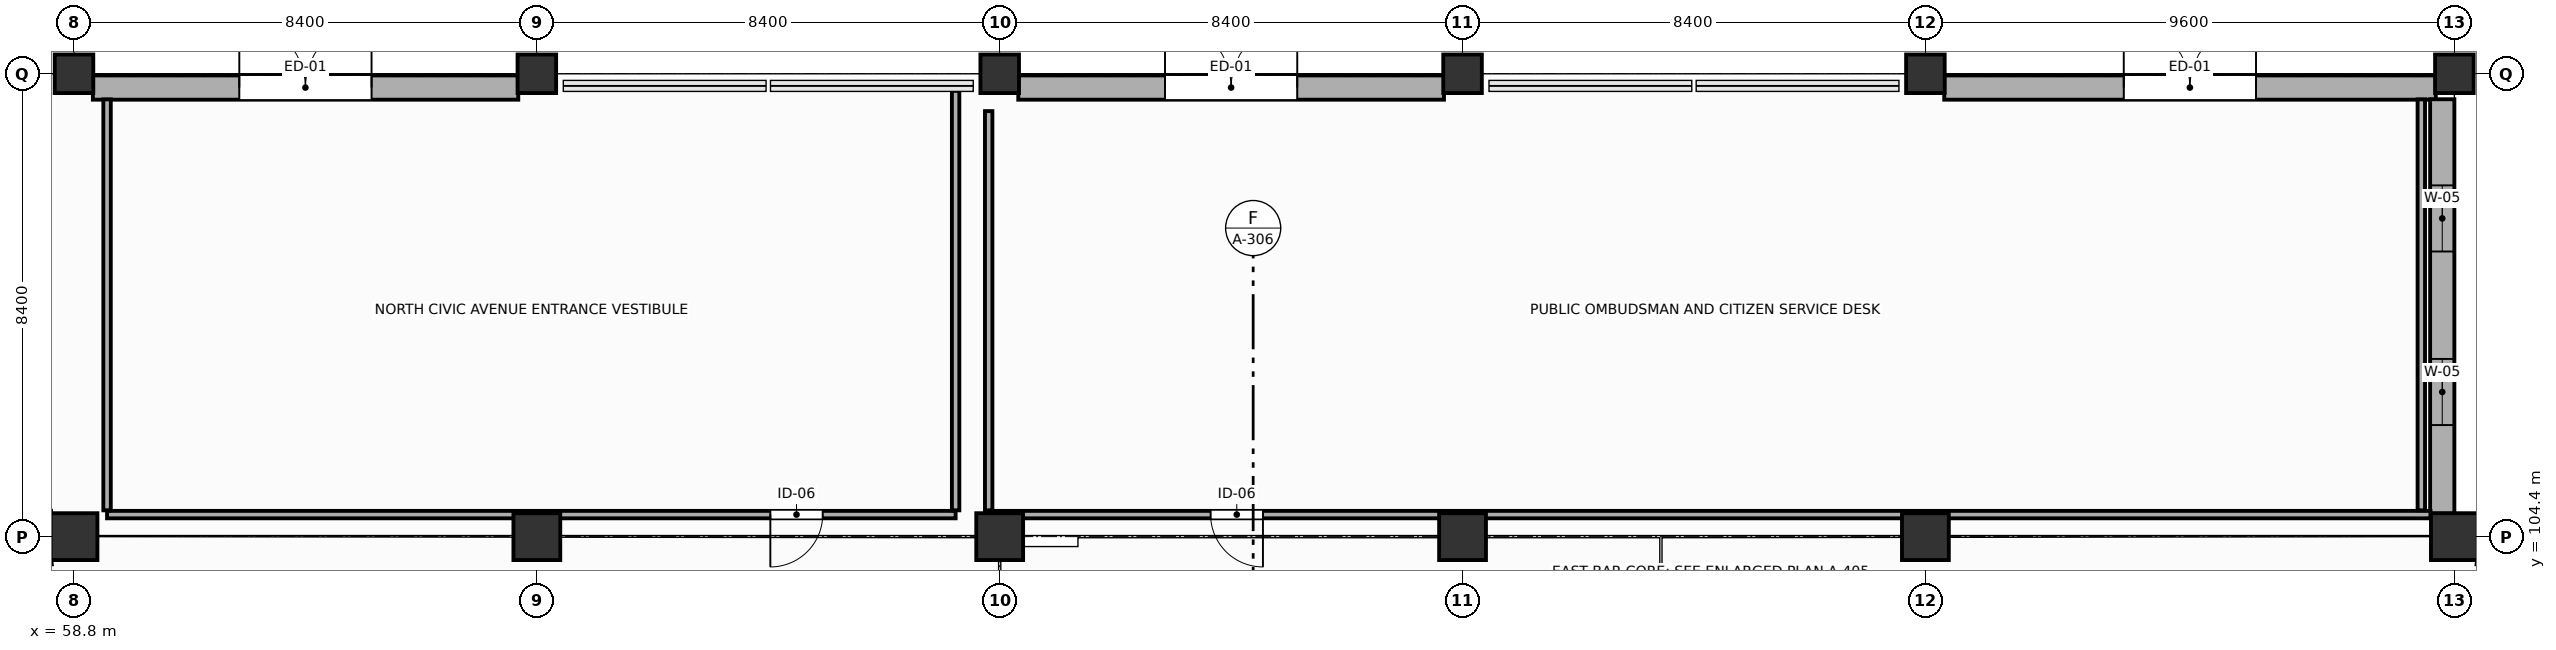
"""IFC4 building model, lengths in metres.
Left out: names, types, materials, properties, quantities, classifications, styles, units other than length and angle.
Written with IfcOpenShell. Run it as: python <this file> out.ifc"""

import sys

from ifc_helpers import new_model, si_unit, direction, frame, frame_2d, origin, origin_2d, place, context, subcontext, project, spatial, rectangle, extrude, element, fill, save


model = new_model("IFC4")
c1 = context("Model", 3, precision=1e-05, world=origin(), true_north=direction((0.0, 1.0)))
c2 = subcontext(c1, "Body", "Model", "MODEL_VIEW")
j1 = project(units=[si_unit("LENGTHUNIT", "METRE"), si_unit("PLANEANGLEUNIT", "RADIAN")], contexts=[c1])
p1 = place(None, origin())
s1 = spatial("IfcSite", under=j1, at=p1, CompositionType="ELEMENT")
p2 = place(p1, origin())
s2 = spatial("IfcBuilding", under=s1, at=p2, CompositionType="ELEMENT")
p3 = place(p2, origin())
s3 = spatial("IfcBuildingStorey", under=s2, at=p3, CompositionType="ELEMENT", Elevation=0.0)
p4 = place(p3, frame((58.8, 104.4, 0.0), z_axis=(0.0, 0.0, 1.0), x_axis=(1.0, 0.0, 0.0)))
e1 = element("IfcColumn", 1, at=p4, inside=s3, PredefinedType="COLUMN", context=c2, shape_type="SweptSolid", body=[
    extrude(rectangle(XDim=0.85, YDim=0.85, at=origin_2d()), origin(), (0.0, 0.0, 1.0), 5.4),
])
p5 = place(p3, frame((58.8, 112.8, 0.0), z_axis=(0.0, 0.0, 1.0), x_axis=(1.0, 0.0, 0.0)))
e2 = element("IfcColumn", 2, at=p5, inside=s3, PredefinedType="COLUMN", context=c2, shape_type="SweptSolid", body=[
    extrude(rectangle(XDim=0.7, YDim=0.7, at=origin_2d()), origin(), (0.0, 0.0, 1.0), 5.4),
])
p6 = place(p3, frame((67.2, 104.4, 0.0), z_axis=(0.0, 0.0, 1.0), x_axis=(1.0, 0.0, 0.0)))
e3 = element("IfcColumn", 3, at=p6, inside=s3, PredefinedType="COLUMN", context=c2, shape_type="SweptSolid", body=[
    extrude(rectangle(XDim=0.85, YDim=0.85, at=origin_2d()), origin(), (0.0, 0.0, 1.0), 5.4),
])
p7 = place(p3, frame((67.2, 112.8, 0.0), z_axis=(0.0, 0.0, 1.0), x_axis=(1.0, 0.0, 0.0)))
e4 = element("IfcColumn", 4, at=p7, inside=s3, PredefinedType="COLUMN", context=c2, shape_type="SweptSolid", body=[
    extrude(rectangle(XDim=0.7, YDim=0.7, at=origin_2d()), origin(), (0.0, 0.0, 1.0), 5.4),
])
p8 = place(p3, frame((75.6, 104.4, 0.0), z_axis=(0.0, 0.0, 1.0), x_axis=(1.0, 0.0, 0.0)))
e5 = element("IfcColumn", 5, at=p8, inside=s3, PredefinedType="COLUMN", context=c2, shape_type="SweptSolid", body=[
    extrude(rectangle(XDim=0.85, YDim=0.85, at=origin_2d()), origin(), (0.0, 0.0, 1.0), 5.4),
])
p9 = place(p3, frame((75.6, 112.8, 0.0), z_axis=(0.0, 0.0, 1.0), x_axis=(1.0, 0.0, 0.0)))
e6 = element("IfcColumn", 6, at=p9, inside=s3, PredefinedType="COLUMN", context=c2, shape_type="SweptSolid", body=[
    extrude(rectangle(XDim=0.7, YDim=0.7, at=origin_2d()), origin(), (0.0, 0.0, 1.0), 5.4),
])
p10 = place(p3, frame((84.0, 104.4, 0.0), z_axis=(0.0, 0.0, 1.0), x_axis=(1.0, 0.0, 0.0)))
e7 = element("IfcColumn", 7, at=p10, inside=s3, PredefinedType="COLUMN", context=c2, shape_type="SweptSolid", body=[
    extrude(rectangle(XDim=0.85, YDim=0.85, at=origin_2d()), origin(), (0.0, 0.0, 1.0), 5.4),
])
p11 = place(p3, frame((84.0, 112.8, 0.0), z_axis=(0.0, 0.0, 1.0), x_axis=(1.0, 0.0, 0.0)))
e8 = element("IfcColumn", 8, at=p11, inside=s3, PredefinedType="COLUMN", context=c2, shape_type="SweptSolid", body=[
    extrude(rectangle(XDim=0.7, YDim=0.7, at=origin_2d()), origin(), (0.0, 0.0, 1.0), 5.4),
])
p12 = place(p3, frame((92.4, 104.4, 0.0), z_axis=(0.0, 0.0, 1.0), x_axis=(1.0, 0.0, 0.0)))
e9 = element("IfcColumn", 9, at=p12, inside=s3, PredefinedType="COLUMN", context=c2, shape_type="SweptSolid", body=[
    extrude(rectangle(XDim=0.85, YDim=0.85, at=origin_2d()), origin(), (0.0, 0.0, 1.0), 5.4),
])
p13 = place(p3, frame((92.4, 112.8, 0.0), z_axis=(0.0, 0.0, 1.0), x_axis=(1.0, 0.0, 0.0)))
e10 = element("IfcColumn", 10, at=p13, inside=s3, PredefinedType="COLUMN", context=c2, shape_type="SweptSolid", body=[
    extrude(rectangle(XDim=0.7, YDim=0.7, at=origin_2d()), origin(), (0.0, 0.0, 1.0), 5.4),
])
p14 = place(p3, frame((102.0, 104.4, 0.0), z_axis=(0.0, 0.0, 1.0), x_axis=(1.0, 0.0, 0.0)))
e11 = element("IfcColumn", 11, at=p14, inside=s3, PredefinedType="COLUMN", context=c2, shape_type="SweptSolid", body=[
    extrude(rectangle(XDim=0.85, YDim=0.85, at=origin_2d()), origin(), (0.0, 0.0, 1.0), 5.4),
])
p15 = place(p3, frame((102.0, 112.8, 0.0), z_axis=(0.0, 0.0, 1.0), x_axis=(1.0, 0.0, 0.0)))
e12 = element("IfcColumn", 12, at=p15, inside=s3, PredefinedType="COLUMN", context=c2, shape_type="SweptSolid", body=[
    extrude(rectangle(XDim=0.7, YDim=0.7, at=origin_2d()), origin(), (0.0, 0.0, 1.0), 5.4),
])
p16 = place(p3, frame((59.142, 112.55, 0.0), z_axis=(0.0, 0.0, 1.0), x_axis=(1.0, 0.0, 0.0)))
e13 = element("IfcWall", 13, at=p16, inside=s3, PredefinedType="STANDARD", context=c2, shape_type="SweptSolid", body=[
    extrude(rectangle(XDim=7.721, YDim=0.44, at=frame_2d((3.86, 0.0))), origin(), (0.0, 0.0, 1.0), 4.67),
])
p17 = place(p16, frame((2.658, 0.0, 0.0)))
e14 = element("IfcOpeningElement", 14, at=p17, cuts=e13, PredefinedType="OPENING", context=c2, shape_type="SweptSolid", body=[
    extrude(rectangle(XDim=2.4, YDim=2.8, at=frame_2d((1.2, 1.4))), frame((0.0, 0.23, 0.0), z_axis=(0.0, -1.0, 0.0), x_axis=(1.0, 0.0, 0.0)), (0.0, 0.0, 1.0), 0.46),
])
p18 = place(p3, frame((75.937, 112.55, 0.0), z_axis=(0.0, 0.0, 1.0), x_axis=(1.0, 0.0, 0.0)))
e15 = element("IfcWall", 15, at=p18, inside=s3, PredefinedType="STANDARD", context=c2, shape_type="SweptSolid", body=[
    extrude(rectangle(XDim=7.726, YDim=0.44, at=frame_2d((3.863, 0.0))), origin(), (0.0, 0.0, 1.0), 4.67),
])
p19 = place(p18, frame((2.663, 0.0, 0.0)))
e16 = element("IfcOpeningElement", 16, at=p19, cuts=e15, PredefinedType="OPENING", context=c2, shape_type="SweptSolid", body=[
    extrude(rectangle(XDim=2.4, YDim=2.8, at=frame_2d((1.2, 1.4))), frame((0.0, 0.23, 0.0), z_axis=(0.0, -1.0, 0.0), x_axis=(1.0, 0.0, 0.0)), (0.0, 0.0, 1.0), 0.46),
])
p20 = place(p3, frame((92.742, 112.55, 0.0), z_axis=(0.0, 0.0, 1.0), x_axis=(1.0, 0.0, 0.0)))
e17 = element("IfcWall", 17, at=p20, inside=s3, PredefinedType="STANDARD", context=c2, shape_type="SweptSolid", body=[
    extrude(rectangle(XDim=8.921, YDim=0.44, at=frame_2d((4.46, 0.0))), origin(), (0.0, 0.0, 1.0), 4.62),
])
p21 = place(p20, frame((3.258, 0.0, 0.0)))
e18 = element("IfcOpeningElement", 18, at=p21, cuts=e17, PredefinedType="OPENING", context=c2, shape_type="SweptSolid", body=[
    extrude(rectangle(XDim=2.4, YDim=2.8, at=frame_2d((1.2, 1.4))), frame((0.0, 0.23, 0.0), z_axis=(0.0, -1.0, 0.0), x_axis=(1.0, 0.0, 0.0)), (0.0, 0.0, 1.0), 0.46),
])
p22 = place(p3, frame((101.78, 112.338, 0.0), z_axis=(0.0, 0.0, 1.0), x_axis=(0.0, -1.0, 0.0)))
e19 = element("IfcWall", 19, at=p22, inside=s3, PredefinedType="STANDARD", context=c2, shape_type="SweptSolid", body=[
    extrude(rectangle(XDim=7.521, YDim=0.44, at=frame_2d((3.76, 0.0))), origin(), (0.0, 0.0, 1.0), 4.27),
])
p23 = place(p22, frame((1.563, 0.0, 0.9)))
e20 = element("IfcOpeningElement", 20, at=p23, cuts=e19, PredefinedType="OPENING", context=c2, shape_type="SweptSolid", body=[
    extrude(rectangle(XDim=1.2, YDim=1.85, at=frame_2d((0.6, 0.925))), frame((0.0, 0.23, 0.0), z_axis=(0.0, -1.0, 0.0), x_axis=(1.0, 0.0, 0.0)), (0.0, 0.0, 1.0), 0.46),
])
p24 = place(p22, frame((4.713, 0.0, 0.9)))
e21 = element("IfcOpeningElement", 21, at=p24, cuts=e19, PredefinedType="OPENING", context=c2, shape_type="SweptSolid", body=[
    extrude(rectangle(XDim=1.2, YDim=1.85, at=frame_2d((0.6, 0.925))), frame((0.0, 0.23, 0.0), z_axis=(0.0, -1.0, 0.0), x_axis=(1.0, 0.0, 0.0)), (0.0, 0.0, 1.0), 0.46),
])
p25 = place(p3, frame((74.8, 104.8, 0.0), z_axis=(0.0, 0.0, 1.0), x_axis=(-1.0, 0.0, 0.0)))
e22 = element("IfcWall", 22, at=p25, inside=s3, PredefinedType="PARTITIONING", context=c2, shape_type="SweptSolid", body=[
    extrude(rectangle(XDim=15.4, YDim=0.135, at=frame_2d((7.7, 0.0))), origin(), (0.0, 0.0, 1.0), 4.27),
])
p26 = place(p25, frame((2.413, 0.0, 0.0)))
e23 = element("IfcOpeningElement", 23, at=p26, cuts=e22, PredefinedType="OPENING", context=c2, shape_type="SweptSolid", body=[
    extrude(rectangle(XDim=0.95, YDim=2.15, at=frame_2d((0.475, 1.075))), frame((0.0, 0.077, 0.0), z_axis=(0.0, -1.0, 0.0), x_axis=(1.0, 0.0, 0.0)), (0.0, 0.0, 1.0), 0.155),
])
p27 = place(p3, frame((59.4, 104.877, 0.0), z_axis=(0.0, 0.0, 1.0), x_axis=(0.0, 1.0, 0.0)))
e24 = element("IfcWall", 24, at=p27, inside=s3, PredefinedType="PARTITIONING", context=c2, shape_type="SweptSolid", body=[
    extrude(rectangle(XDim=7.458, YDim=0.135, at=frame_2d((3.729, 0.0))), origin(), (0.0, 0.0, 1.0), 4.79),
])
p28 = place(p3, frame((74.8, 112.49, 0.0), z_axis=(0.0, 0.0, 1.0), x_axis=(0.0, -1.0, 0.0)))
e25 = element("IfcWall", 25, at=p28, inside=s3, PredefinedType="PARTITIONING", context=c2, shape_type="SweptSolid", body=[
    extrude(rectangle(XDim=7.613, YDim=0.135, at=frame_2d((3.806, 0.0))), origin(), (0.0, 0.0, 1.0), 4.67),
])
p29 = place(p3, frame((101.566, 104.8, 0.0), z_axis=(0.0, 0.0, 1.0), x_axis=(-1.0, 0.0, 0.0)))
e26 = element("IfcWall", 26, at=p29, inside=s3, PredefinedType="PARTITIONING", context=c2, shape_type="SweptSolid", body=[
    extrude(rectangle(XDim=26.166, YDim=0.135, at=frame_2d((13.083, 0.0))), origin(), (0.0, 0.0, 1.0), 4.27),
])
p30 = place(p29, frame((21.189, 0.0, 0.0)))
e27 = element("IfcOpeningElement", 27, at=p30, cuts=e26, PredefinedType="OPENING", context=c2, shape_type="SweptSolid", body=[
    extrude(rectangle(XDim=0.95, YDim=2.15, at=frame_2d((0.475, 1.075))), frame((0.0, 0.077, 0.0), z_axis=(0.0, -1.0, 0.0), x_axis=(1.0, 0.0, 0.0)), (0.0, 0.0, 1.0), 0.155),
])
p31 = place(p3, frame((75.4, 104.877, 0.0), z_axis=(0.0, 0.0, 1.0), x_axis=(0.0, 1.0, 0.0)))
e28 = element("IfcWall", 28, at=p31, inside=s3, PredefinedType="PARTITIONING", context=c2, shape_type="SweptSolid", body=[
    extrude(rectangle(XDim=7.245, YDim=0.135, at=frame_2d((3.623, 0.0))), origin(), (0.0, 0.0, 1.0), 4.27),
])
p32 = place(p3, frame((101.4, 112.336, 0.0), z_axis=(0.0, 0.0, 1.0), x_axis=(0.0, -1.0, 0.0)))
e29 = element("IfcWall", 29, at=p32, inside=s3, PredefinedType="PARTITIONING", context=c2, shape_type="SweptSolid", body=[
    extrude(rectangle(XDim=7.458, YDim=0.135, at=frame_2d((3.729, 0.0))), origin(), (0.0, 0.0, 1.0), 4.57),
])
p33 = place(p17, origin())
e30 = element("IfcDoor", 30, at=p33, inside=s3, OperationType="DOUBLE_DOOR_SINGLE_SWING", PredefinedType="DOOR", context=c2, shape_type="SweptSolid", body=[
    extrude(rectangle(XDim=2.4, YDim=2.8, at=frame_2d((1.2, 1.4))), frame((0.0, 0.025, 0.0), z_axis=(0.0, -1.0, 0.0), x_axis=(1.0, 0.0, 0.0)), (0.0, 0.0, 1.0), 0.05),
])
fill(e14, e30)
p34 = place(p19, origin())
e31 = element("IfcDoor", 31, at=p34, inside=s3, OperationType="DOUBLE_DOOR_SINGLE_SWING", PredefinedType="DOOR", context=c2, shape_type="SweptSolid", body=[
    extrude(rectangle(XDim=2.4, YDim=2.8, at=frame_2d((1.2, 1.4))), frame((0.0, 0.025, 0.0), z_axis=(0.0, -1.0, 0.0), x_axis=(1.0, 0.0, 0.0)), (0.0, 0.0, 1.0), 0.05),
])
fill(e16, e31)
p35 = place(p21, origin())
e32 = element("IfcDoor", 32, at=p35, inside=s3, OperationType="DOUBLE_DOOR_SINGLE_SWING", PredefinedType="DOOR", context=c2, shape_type="SweptSolid", body=[
    extrude(rectangle(XDim=2.4, YDim=2.8, at=frame_2d((1.2, 1.4))), frame((0.0, 0.025, 0.0), z_axis=(0.0, -1.0, 0.0), x_axis=(1.0, 0.0, 0.0)), (0.0, 0.0, 1.0), 0.05),
])
fill(e18, e32)
p36 = place(p23, origin())
e33 = element("IfcWindow", 33, at=p36, inside=s3, PartitioningType="SINGLE_PANEL", PredefinedType="WINDOW", context=c2, shape_type="SweptSolid", body=[
    extrude(rectangle(XDim=1.2, YDim=1.85, at=frame_2d((0.6, 0.925))), frame((0.0, 0.03, 0.0), z_axis=(0.0, -1.0, 0.0), x_axis=(1.0, 0.0, 0.0)), (0.0, 0.0, 1.0), 0.06),
])
fill(e20, e33)
p37 = place(p24, origin())
e34 = element("IfcWindow", 34, at=p37, inside=s3, PartitioningType="SINGLE_PANEL", PredefinedType="WINDOW", context=c2, shape_type="SweptSolid", body=[
    extrude(rectangle(XDim=1.2, YDim=1.85, at=frame_2d((0.6, 0.925))), frame((0.0, 0.03, 0.0), z_axis=(0.0, -1.0, 0.0), x_axis=(1.0, 0.0, 0.0)), (0.0, 0.0, 1.0), 0.06),
])
fill(e21, e34)
p38 = place(p26, origin())
e35 = element("IfcDoor", 35, at=p38, inside=s3, OperationType="SINGLE_SWING_RIGHT", PredefinedType="DOOR", context=c2, shape_type="SweptSolid", body=[
    extrude(rectangle(XDim=0.95, YDim=2.15, at=frame_2d((0.475, 1.075))), frame((0.0, 0.025, 0.0), z_axis=(0.0, -1.0, 0.0), x_axis=(1.0, 0.0, 0.0)), (0.0, 0.0, 1.0), 0.05),
])
fill(e23, e35)
p39 = place(p30, origin())
e36 = element("IfcDoor", 36, at=p39, inside=s3, OperationType="SINGLE_SWING_LEFT", PredefinedType="DOOR", context=c2, shape_type="SweptSolid", body=[
    extrude(rectangle(XDim=0.95, YDim=2.15, at=frame_2d((0.475, 1.075))), frame((0.0, 0.025, 0.0), z_axis=(0.0, -1.0, 0.0), x_axis=(1.0, 0.0, 0.0)), (0.0, 0.0, 1.0), 0.05),
])
fill(e27, e36)
save(model, sys.argv[1])
